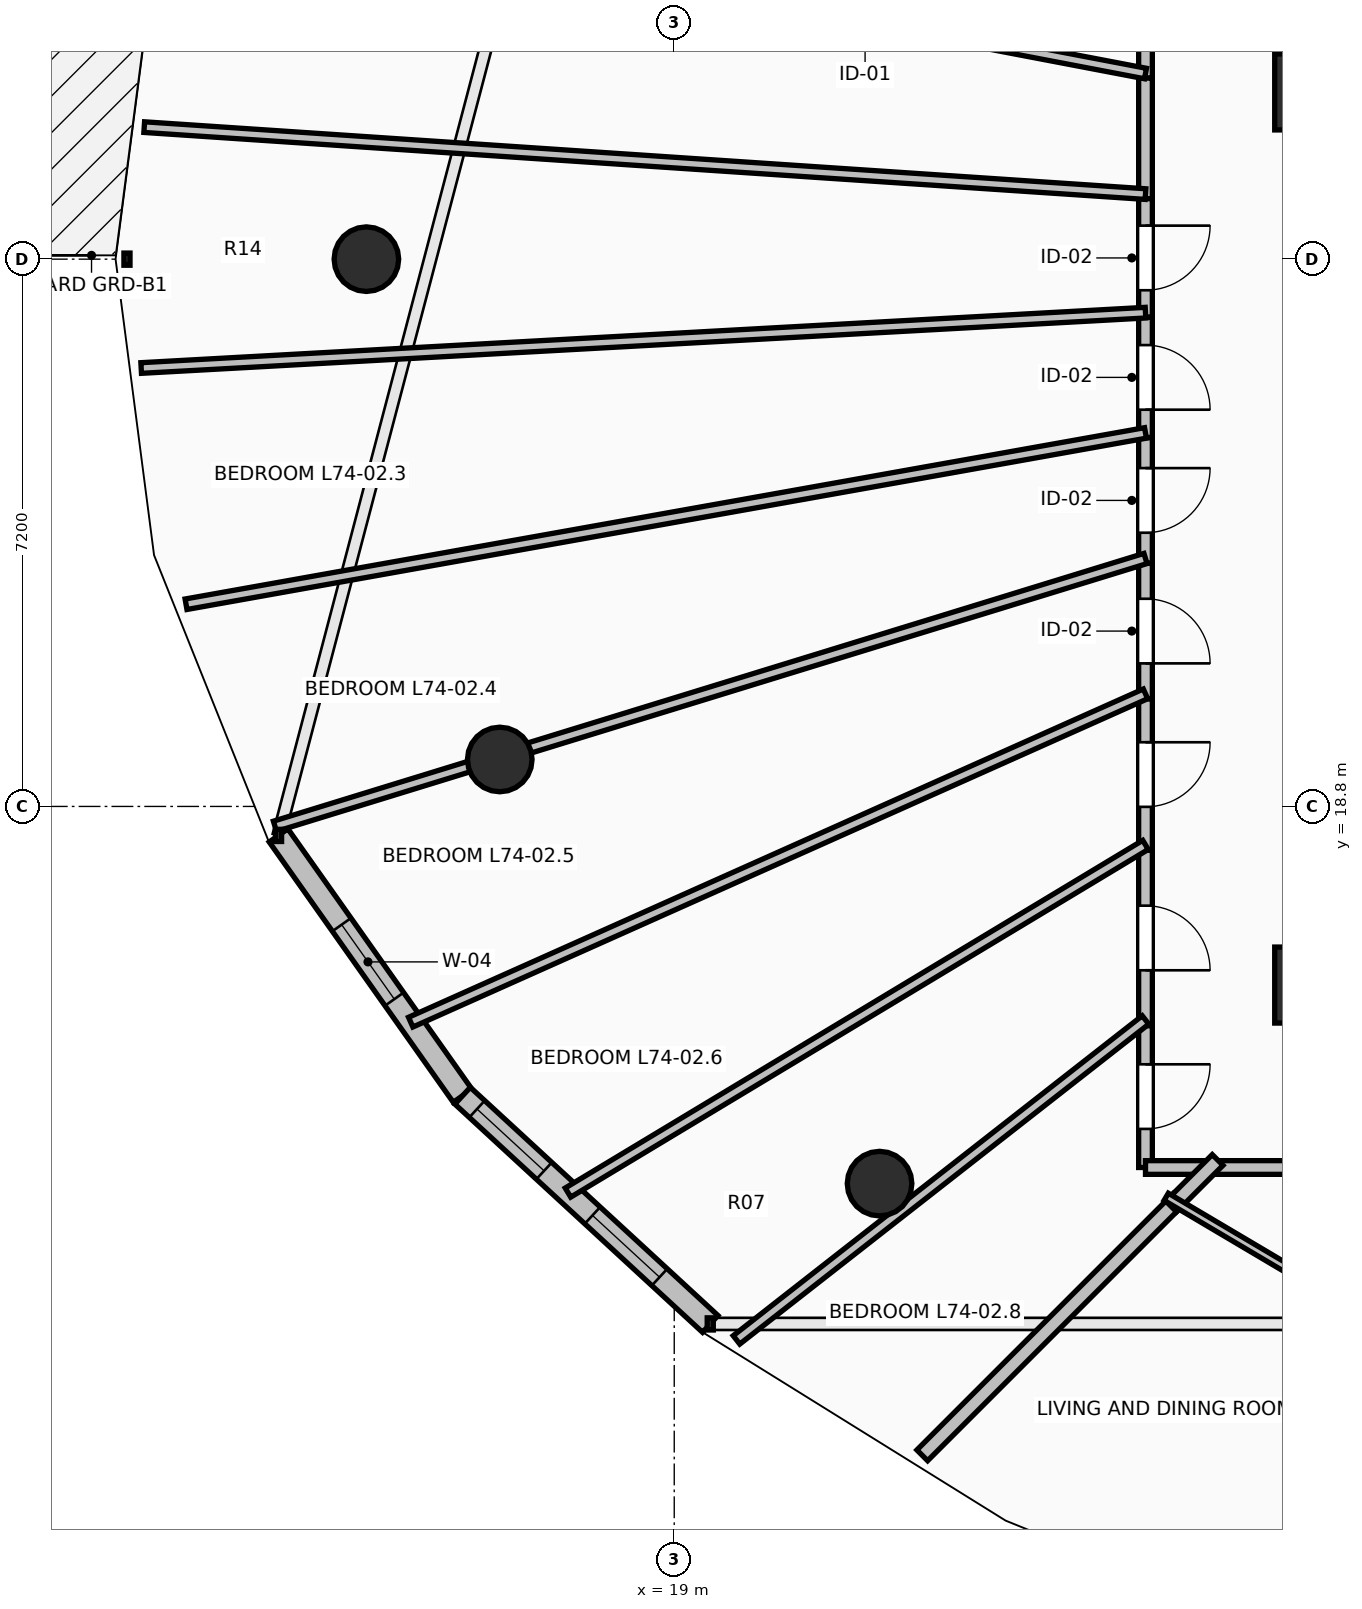
"""IFC4 building model, lengths in metres.
Left out: names, types, materials, properties, quantities, classifications, styles, units other than length and angle.
Written with IfcOpenShell. Run it as: python <this file> out.ifc"""

import sys

from ifc_helpers import new_model, si_unit, direction, frame, frame_2d, origin, origin_2d, place, context, subcontext, project, spatial, rectangle, circle, extrude, element, fill, save


model = new_model("IFC4")
c1 = context("Model", 3, precision=1e-05, world=origin(), true_north=direction((0.0, 1.0)))
c2 = subcontext(c1, "Body", "Model", "MODEL_VIEW")
j1 = project(units=[si_unit("LENGTHUNIT", "METRE"), si_unit("PLANEANGLEUNIT", "RADIAN")], contexts=[c1])
p1 = place(None, origin())
s1 = spatial("IfcSite", under=j1, at=p1, CompositionType="ELEMENT")
p2 = place(p1, origin())
s2 = spatial("IfcBuilding", under=s1, at=p2, CompositionType="ELEMENT")
p3 = place(p2, frame((0.0, 0.0, 273.3)))
s3 = spatial("IfcBuildingStorey", under=s2, at=p3, CompositionType="ELEMENT", Elevation=273.3)
for number, where, z_axis, x_axis in (
    (1, (14.95, 26.0, 0.0), (0.0, 0.0, 1.0), (-1.0, 0.0, 0.0)),
    (2, (16.705, 19.418, 0.0), (0.0, 0.0, 1.0), (-0.924, -0.383, 0.0)),
    (3, (21.701, 13.838, 0.0), (0.0, 0.0, 1.0), (-0.707, -0.707, 0.0)),
):
    element("IfcColumn", number, at=place(p3, frame(where, z_axis=z_axis, x_axis=x_axis)), inside=s3, PredefinedType="COLUMN", context=c2, shape_type="SweptSolid", body=[
        extrude(circle(Radius=0.425, at=origin_2d()), origin(), (0.0, 0.0, 1.0), 3.55),
    ])
for number, where, z_axis, x_axis in (
    (4, (27.25, 16.45, 0.0), (0.0, 0.0, 1.0), (1.0, 0.0, 0.0)),
    (5, (27.25, 28.2, 0.0), (0.0, 0.0, 1.0), (1.0, 0.0, 0.0)),
):
    element("IfcColumn", number, at=place(p3, frame(where, z_axis=z_axis, x_axis=x_axis)), inside=s3, PredefinedType="PILASTER", context=c2, shape_type="SweptSolid", body=[
        extrude(rectangle(XDim=0.7, YDim=1.0, at=origin_2d()), origin(), (0.0, 0.0, 1.0), 3.55),
    ])
p4 = place(p3, frame((13.794, 18.419, 0.0), z_axis=(0.0, 0.0, 1.0), x_axis=(0.577261247247, -0.816559521668, 0.0)))
e6 = element("IfcWall", 6, at=p4, inside=s3, PredefinedType="STANDARD", context=c2, shape_type="SweptSolid", body=[
    extrude(rectangle(XDim=4.194, YDim=0.3, at=frame_2d((2.097, 0.0))), origin(), (0.0, 0.0, 1.0), 3.29),
])
p5 = place(p4, frame((1.438, 0.0, 0.85)))
e7 = element("IfcOpeningElement", 7, at=p5, cuts=e6, PredefinedType="OPENING", context=c2, shape_type="SweptSolid", body=[
    extrude(rectangle(XDim=1.2, YDim=1.95, at=frame_2d((0.6, 0.975))), frame((0.0, 0.165, 0.0), z_axis=(0.0, -1.0, 0.0), x_axis=(1.0, 0.0, 0.0)), (0.0, 0.0, 1.0), 0.33),
])
p6 = place(p3, frame((16.216, 14.994, 0.0), z_axis=(0.0, 0.0, 1.0), x_axis=(0.735445373611, -0.677584018727, 0.0)))
e8 = element("IfcWall", 8, at=p6, inside=s3, PredefinedType="STANDARD", context=c2, shape_type="SweptSolid", body=[
    extrude(rectangle(XDim=4.43, YDim=0.3, at=frame_2d((2.215, 0.0))), origin(), (0.0, 0.0, 1.0), 3.29),
])
p7 = place(p6, frame((0.258, 0.0, 0.85)))
e9 = element("IfcOpeningElement", 9, at=p7, cuts=e8, PredefinedType="OPENING", context=c2, shape_type="SweptSolid", body=[
    extrude(rectangle(XDim=1.2, YDim=1.95, at=frame_2d((0.6, 0.975))), frame((0.0, 0.165, 0.0), z_axis=(0.0, -1.0, 0.0), x_axis=(1.0, 0.0, 0.0)), (0.0, 0.0, 1.0), 0.33),
])
p8 = place(p6, frame((2.323, 0.0, 0.85)))
e10 = element("IfcOpeningElement", 10, at=p8, cuts=e8, PredefinedType="OPENING", context=c2, shape_type="SweptSolid", body=[
    extrude(rectangle(XDim=1.2, YDim=1.95, at=frame_2d((0.6, 0.975))), frame((0.0, 0.165, 0.0), z_axis=(0.0, -1.0, 0.0), x_axis=(1.0, 0.0, 0.0)), (0.0, 0.0, 1.0), 0.33),
])
p9 = place(p3, frame((25.2, 33.445, 0.0), z_axis=(0.0, 0.0, 1.0), x_axis=(0.0, -1.0, 0.0)))
e11 = element("IfcWall", 11, at=p9, inside=s3, PredefinedType="PARTITIONING", context=c2, shape_type="SweptSolid", body=[
    extrude(rectangle(XDim=5.063, YDim=0.18, at=frame_2d((2.531, 0.0))), origin(), (0.0, 0.0, 1.0), 2.482),
])
p10 = place(p9, frame((2.031, 0.0, 0.0)))
e12 = element("IfcOpeningElement", 12, at=p10, cuts=e11, PredefinedType="OPENING", context=c2, shape_type="SweptSolid", body=[
    extrude(rectangle(XDim=1.0, YDim=2.15, at=frame_2d((0.5, 1.075))), frame((0.0, 0.105, 0.0), z_axis=(0.0, -1.0, 0.0), x_axis=(1.0, 0.0, 0.0)), (0.0, 0.0, 1.0), 0.21),
])
p11 = place(p3, frame((25.2, 28.382, 0.0), z_axis=(0.0, 0.0, 1.0), x_axis=(0.0, -1.0, 0.0)))
e13 = element("IfcWall", 13, at=p11, inside=s3, PredefinedType="PARTITIONING", context=c2, shape_type="SweptSolid", body=[
    extrude(rectangle(XDim=1.586, YDim=0.18, at=frame_2d((0.793, 0.0))), origin(), (0.0, 0.0, 1.0), 2.482),
])
p12 = place(p3, frame((25.2, 26.796, 0.0), z_axis=(0.0, 0.0, 1.0), x_axis=(0.0, -1.0, 0.0)))
e14 = element("IfcWall", 14, at=p12, inside=s3, PredefinedType="PARTITIONING", context=c2, shape_type="SweptSolid", body=[
    extrude(rectangle(XDim=1.56, YDim=0.18, at=frame_2d((0.78, 0.0))), origin(), (0.0, 0.0, 1.0), 3.29),
])
p13 = place(p12, frame((0.355, 0.0, 0.0)))
e15 = element("IfcOpeningElement", 15, at=p13, cuts=e14, PredefinedType="OPENING", context=c2, shape_type="SweptSolid", body=[
    extrude(rectangle(XDim=0.85, YDim=2.1, at=frame_2d((0.425, 1.05))), frame((0.0, 0.105, 0.0), z_axis=(0.0, -1.0, 0.0), x_axis=(1.0, 0.0, 0.0)), (0.0, 0.0, 1.0), 0.21),
])
p14 = place(p3, frame((25.2, 25.236, 0.0), z_axis=(0.0, 0.0, 1.0), x_axis=(0.0, -1.0, 0.0)))
e16 = element("IfcWall", 16, at=p14, inside=s3, PredefinedType="PARTITIONING", context=c2, shape_type="SweptSolid", body=[
    extrude(rectangle(XDim=1.583, YDim=0.18, at=frame_2d((0.792, 0.0))), origin(), (0.0, 0.0, 1.0), 3.29),
])
p15 = place(p14, frame((0.366, 0.0, 0.0)))
e17 = element("IfcOpeningElement", 17, at=p15, cuts=e16, PredefinedType="OPENING", context=c2, shape_type="SweptSolid", body=[
    extrude(rectangle(XDim=0.85, YDim=2.1, at=frame_2d((0.425, 1.05))), frame((0.0, 0.105, 0.0), z_axis=(0.0, -1.0, 0.0), x_axis=(1.0, 0.0, 0.0)), (0.0, 0.0, 1.0), 0.21),
])
p16 = place(p3, frame((25.2, 23.653, 0.0), z_axis=(0.0, 0.0, 1.0), x_axis=(0.0, -1.0, 0.0)))
e18 = element("IfcWall", 18, at=p16, inside=s3, PredefinedType="PARTITIONING", context=c2, shape_type="SweptSolid", body=[
    extrude(rectangle(XDim=1.654, YDim=0.18, at=frame_2d((0.827, 0.0))), origin(), (0.0, 0.0, 1.0), 3.29),
])
p17 = place(p16, frame((0.402, 0.0, 0.0)))
e19 = element("IfcOpeningElement", 19, at=p17, cuts=e18, PredefinedType="OPENING", context=c2, shape_type="SweptSolid", body=[
    extrude(rectangle(XDim=0.85, YDim=2.1, at=frame_2d((0.425, 1.05))), frame((0.0, 0.105, 0.0), z_axis=(0.0, -1.0, 0.0), x_axis=(1.0, 0.0, 0.0)), (0.0, 0.0, 1.0), 0.21),
])
p18 = place(p3, frame((25.2, 21.999, 0.0), z_axis=(0.0, 0.0, 1.0), x_axis=(0.0, -1.0, 0.0)))
e20 = element("IfcWall", 20, at=p18, inside=s3, PredefinedType="PARTITIONING", context=c2, shape_type="SweptSolid", body=[
    extrude(rectangle(XDim=1.784, YDim=0.18, at=frame_2d((0.892, 0.0))), origin(), (0.0, 0.0, 1.0), 3.29),
])
p19 = place(p18, frame((0.467, 0.0, 0.0)))
e21 = element("IfcOpeningElement", 21, at=p19, cuts=e20, PredefinedType="OPENING", context=c2, shape_type="SweptSolid", body=[
    extrude(rectangle(XDim=0.85, YDim=2.1, at=frame_2d((0.425, 1.05))), frame((0.0, 0.105, 0.0), z_axis=(0.0, -1.0, 0.0), x_axis=(1.0, 0.0, 0.0)), (0.0, 0.0, 1.0), 0.21),
])
p20 = place(p3, frame((25.2, 20.215, 0.0), z_axis=(0.0, 0.0, 1.0), x_axis=(0.0, -1.0, 0.0)))
e22 = element("IfcWall", 22, at=p20, inside=s3, PredefinedType="PARTITIONING", context=c2, shape_type="SweptSolid", body=[
    extrude(rectangle(XDim=1.991, YDim=0.18, at=frame_2d((0.996, 0.0))), origin(), (0.0, 0.0, 1.0), 3.29),
])
p21 = place(p20, frame((0.571, 0.0, 0.0)))
e23 = element("IfcOpeningElement", 23, at=p21, cuts=e22, PredefinedType="OPENING", context=c2, shape_type="SweptSolid", body=[
    extrude(rectangle(XDim=0.85, YDim=2.1, at=frame_2d((0.425, 1.05))), frame((0.0, 0.105, 0.0), z_axis=(0.0, -1.0, 0.0), x_axis=(1.0, 0.0, 0.0)), (0.0, 0.0, 1.0), 0.21),
])
p22 = place(p3, frame((25.2, 18.224, 0.0), z_axis=(0.0, 0.0, 1.0), x_axis=(0.0, -1.0, 0.0)))
e24 = element("IfcWall", 24, at=p22, inside=s3, PredefinedType="PARTITIONING", context=c2, shape_type="SweptSolid", body=[
    extrude(rectangle(XDim=2.309, YDim=0.18, at=frame_2d((1.155, 0.0))), origin(), (0.0, 0.0, 1.0), 2.482),
])
p23 = place(p22, frame((0.729, 0.0, 0.0)))
e25 = element("IfcOpeningElement", 25, at=p23, cuts=e24, PredefinedType="OPENING", context=c2, shape_type="SweptSolid", body=[
    extrude(rectangle(XDim=0.85, YDim=2.1, at=frame_2d((0.425, 1.05))), frame((0.0, 0.105, 0.0), z_axis=(0.0, -1.0, 0.0), x_axis=(1.0, 0.0, 0.0)), (0.0, 0.0, 1.0), 0.21),
])
p24 = place(p3, frame((25.2, 15.915, 0.0), z_axis=(0.0, 0.0, 1.0), x_axis=(0.0, -1.0, 0.0)))
e26 = element("IfcWall", 26, at=p24, inside=s3, PredefinedType="PARTITIONING", context=c2, shape_type="SweptSolid", body=[
    extrude(rectangle(XDim=1.865, YDim=0.18, at=frame_2d((0.933, 0.0))), origin(), (0.0, 0.0, 1.0), 2.482),
])
p25 = place(p24, frame((0.508, 0.0, 0.0)))
e27 = element("IfcOpeningElement", 27, at=p25, cuts=e26, PredefinedType="OPENING", context=c2, shape_type="SweptSolid", body=[
    extrude(rectangle(XDim=0.85, YDim=2.1, at=frame_2d((0.425, 1.05))), frame((0.0, 0.105, 0.0), z_axis=(0.0, -1.0, 0.0), x_axis=(1.0, 0.0, 0.0)), (0.0, 0.0, 1.0), 0.21),
])
p26 = place(p3, frame((25.2, 14.05, 0.0), z_axis=(0.0, 0.0, 1.0), x_axis=(1.0, 0.0, 0.0)))
e28 = element("IfcWall", 28, at=p26, inside=s3, PredefinedType="PARTITIONING", context=c2, shape_type="SweptSolid", body=[
    extrude(rectangle(XDim=0.91, YDim=0.18, at=frame_2d((0.455, 0.0))), origin(), (0.0, 0.0, 1.0), 2.979),
])
p27 = place(p3, frame((25.97, 14.05, 0.0), z_axis=(0.0, 0.0, 1.0), x_axis=(1.0, 0.0, 0.0)))
e29 = element("IfcWall", 29, at=p27, inside=s3, PredefinedType="PARTITIONING", context=c2, shape_type="SweptSolid", body=[
    extrude(rectangle(XDim=5.215, YDim=0.18, at=frame_2d((2.607, 0.0))), origin(), (0.0, 0.0, 1.0), 2.482),
])
p28 = place(p3, frame((17.889, 29.837, 0.0), z_axis=(0.0, 0.0, 1.0), x_axis=(0.982284262094, -0.187396980877, 0.0)))
e30 = element("IfcWall", 30, at=p28, inside=s3, PredefinedType="PARTITIONING", context=c2, shape_type="SweptSolid", body=[
    extrude(rectangle(XDim=7.443, YDim=0.14, at=frame_2d((3.721, 0.0))), origin(), (0.0, 0.0, 1.0), 2.924),
])
p29 = place(p28, frame((3.271, 0.0, 0.0)))
e31 = element("IfcOpeningElement", 31, at=p29, cuts=e30, PredefinedType="OPENING", context=c2, shape_type="SweptSolid", body=[
    extrude(rectangle(XDim=0.9, YDim=2.1, at=frame_2d((0.45, 1.05))), frame((0.0, 0.085, 0.0), z_axis=(0.0, -1.0, 0.0), x_axis=(1.0, 0.0, 0.0)), (0.0, 0.0, 1.0), 0.17),
])
p30 = place(p3, frame((12.027, 27.737, 0.0), z_axis=(0.0, 0.0, 1.0), x_axis=(0.997770487114, -0.066738707243, 0.0)))
e32 = element("IfcWall", 32, at=p30, inside=s3, PredefinedType="PARTITIONING", context=c2, shape_type="SweptSolid", body=[
    extrude(rectangle(XDim=13.202, YDim=0.14, at=frame_2d((6.601, 0.0))), origin(), (0.0, 0.0, 1.0), 2.482),
])
p31 = place(p3, frame((11.987, 24.568, 0.0), z_axis=(0.0, 0.0, 1.0), x_axis=(0.998486468265, 0.054997933516, 0.0)))
e33 = element("IfcWall", 33, at=p31, inside=s3, PredefinedType="PARTITIONING", context=c2, shape_type="SweptSolid", body=[
    extrude(rectangle(XDim=13.233, YDim=0.14, at=frame_2d((6.616, 0.0))), origin(), (0.0, 0.0, 1.0), 2.874),
])
p32 = place(p3, frame((12.577, 21.46, 0.0), z_axis=(0.0, 0.0, 1.0), x_axis=(0.984427104809, 0.175793274383, 0.0)))
e34 = element("IfcWall", 34, at=p32, inside=s3, PredefinedType="PARTITIONING", context=c2, shape_type="SweptSolid", body=[
    extrude(rectangle(XDim=12.823, YDim=0.14, at=frame_2d((6.411, 0.0))), origin(), (0.0, 0.0, 1.0), 2.874),
])
p33 = place(p3, frame((13.747, 18.539, 0.0), z_axis=(0.0, 0.0, 1.0), x_axis=(0.955802794564, 0.294008533725, 0.0)))
e35 = element("IfcWall", 35, at=p33, inside=s3, PredefinedType="PARTITIONING", context=c2, shape_type="SweptSolid", body=[
    extrude(rectangle(XDim=11.982, YDim=0.14, at=frame_2d((5.991, 0.0))), origin(), (0.0, 0.0, 1.0), 2.482),
])
p34 = place(p3, frame((15.533, 15.962, 0.0), z_axis=(0.0, 0.0, 1.0), x_axis=(0.913015836792, 0.407924112756, 0.0)))
e36 = element("IfcWall", 36, at=p34, inside=s3, PredefinedType="PARTITIONING", context=c2, shape_type="SweptSolid", body=[
    extrude(rectangle(XDim=10.588, YDim=0.14, at=frame_2d((5.294, 0.0))), origin(), (0.0, 0.0, 1.0), 2.482),
])
p35 = place(p3, frame((17.602, 13.72, 0.0), z_axis=(0.0, 0.0, 1.0), x_axis=(0.856734134601, 0.515758298633, 0.0)))
e37 = element("IfcWall", 37, at=p35, inside=s3, PredefinedType="PARTITIONING", context=c2, shape_type="SweptSolid", body=[
    extrude(rectangle(XDim=8.868, YDim=0.14, at=frame_2d((4.434, 0.0))), origin(), (0.0, 0.0, 1.0), 2.482),
])
p36 = place(p3, frame((19.819, 11.782, 0.0), z_axis=(0.0, 0.0, 1.0), x_axis=(0.78765580417, 0.61611552014, 0.0)))
e38 = element("IfcWall", 38, at=p36, inside=s3, PredefinedType="PARTITIONING", context=c2, shape_type="SweptSolid", body=[
    extrude(rectangle(XDim=6.832, YDim=0.14, at=frame_2d((3.416, 0.0))), origin(), (0.0, 0.0, 1.0), 2.482),
])
p37 = place(p3, frame((22.263, 10.263, 0.0), z_axis=(0.0, 0.0, 1.0), x_axis=(0.707106781187, 0.707106781187, 0.0)))
e39 = element("IfcWall", 39, at=p37, inside=s3, PredefinedType="PARTITIONING", context=c2, shape_type="SweptSolid", body=[
    extrude(rectangle(XDim=4.771, YDim=0.2, at=frame_2d((2.386, 0.0))), origin(), (0.0, 0.0, 1.0), 2.874),
])
p38 = place(p3, frame((25.538, 13.538, 0.0), z_axis=(0.0, 0.0, 1.0), x_axis=(0.707106781187, 0.707106781187, 0.0)))
e40 = element("IfcWall", 40, at=p38, inside=s3, PredefinedType="PARTITIONING", context=c2, shape_type="SweptSolid", body=[
    extrude(rectangle(XDim=0.864, YDim=0.2, at=frame_2d((0.432, 0.0))), origin(), (0.0, 0.0, 1.0), 2.979),
])
p39 = place(p3, frame((27.611, 12.399, 0.0), z_axis=(0.0, 0.0, 1.0), x_axis=(-0.860546797705, 0.509371386082, 0.0)))
e41 = element("IfcWall", 41, at=p39, inside=s3, PredefinedType="PARTITIONING", context=c2, shape_type="SweptSolid", body=[
    extrude(rectangle(XDim=2.485, YDim=0.11, at=frame_2d((1.242, 0.0))), origin(), (0.0, 0.0, 1.0), 3.29),
])
p40 = place(p5, origin())
e42 = element("IfcWindow", 42, at=p40, inside=s3, PartitioningType="SINGLE_PANEL", PredefinedType="WINDOW", context=c2, shape_type="SweptSolid", body=[
    extrude(rectangle(XDim=1.2, YDim=1.95, at=frame_2d((0.6, 0.975))), frame((0.0, 0.03, 0.0), z_axis=(0.0, -1.0, 0.0), x_axis=(1.0, 0.0, 0.0)), (0.0, 0.0, 1.0), 0.06),
])
fill(e7, e42)
p41 = place(p7, origin())
e43 = element("IfcWindow", 43, at=p41, inside=s3, PartitioningType="SINGLE_PANEL", PredefinedType="WINDOW", context=c2, shape_type="SweptSolid", body=[
    extrude(rectangle(XDim=1.2, YDim=1.95, at=frame_2d((0.6, 0.975))), frame((0.0, 0.03, 0.0), z_axis=(0.0, -1.0, 0.0), x_axis=(1.0, 0.0, 0.0)), (0.0, 0.0, 1.0), 0.06),
])
fill(e9, e43)
p42 = place(p8, origin())
e44 = element("IfcWindow", 44, at=p42, inside=s3, PartitioningType="SINGLE_PANEL", PredefinedType="WINDOW", context=c2, shape_type="SweptSolid", body=[
    extrude(rectangle(XDim=1.2, YDim=1.95, at=frame_2d((0.6, 0.975))), frame((0.0, 0.03, 0.0), z_axis=(0.0, -1.0, 0.0), x_axis=(1.0, 0.0, 0.0)), (0.0, 0.0, 1.0), 0.06),
])
fill(e10, e44)
p43 = place(p13, origin())
e45 = element("IfcDoor", 45, at=p43, inside=s3, OperationType="SINGLE_SWING_LEFT", PredefinedType="DOOR", context=c2, shape_type="SweptSolid", body=[
    extrude(rectangle(XDim=0.85, YDim=2.1, at=frame_2d((0.425, 1.05))), frame((0.0, 0.025, 0.0), z_axis=(0.0, -1.0, 0.0), x_axis=(1.0, 0.0, 0.0)), (0.0, 0.0, 1.0), 0.05),
])
fill(e15, e45)
p44 = place(p15, origin())
e46 = element("IfcDoor", 46, at=p44, inside=s3, OperationType="SINGLE_SWING_RIGHT", PredefinedType="DOOR", context=c2, shape_type="SweptSolid", body=[
    extrude(rectangle(XDim=0.85, YDim=2.1, at=frame_2d((0.425, 1.05))), frame((0.0, 0.025, 0.0), z_axis=(0.0, -1.0, 0.0), x_axis=(1.0, 0.0, 0.0)), (0.0, 0.0, 1.0), 0.05),
])
fill(e17, e46)
p45 = place(p17, origin())
e47 = element("IfcDoor", 47, at=p45, inside=s3, OperationType="SINGLE_SWING_LEFT", PredefinedType="DOOR", context=c2, shape_type="SweptSolid", body=[
    extrude(rectangle(XDim=0.85, YDim=2.1, at=frame_2d((0.425, 1.05))), frame((0.0, 0.025, 0.0), z_axis=(0.0, -1.0, 0.0), x_axis=(1.0, 0.0, 0.0)), (0.0, 0.0, 1.0), 0.05),
])
fill(e19, e47)
p46 = place(p19, origin())
e48 = element("IfcDoor", 48, at=p46, inside=s3, OperationType="SINGLE_SWING_RIGHT", PredefinedType="DOOR", context=c2, shape_type="SweptSolid", body=[
    extrude(rectangle(XDim=0.85, YDim=2.1, at=frame_2d((0.425, 1.05))), frame((0.0, 0.025, 0.0), z_axis=(0.0, -1.0, 0.0), x_axis=(1.0, 0.0, 0.0)), (0.0, 0.0, 1.0), 0.05),
])
fill(e21, e48)
p47 = place(p21, origin())
e49 = element("IfcDoor", 49, at=p47, inside=s3, OperationType="SINGLE_SWING_LEFT", PredefinedType="DOOR", context=c2, shape_type="SweptSolid", body=[
    extrude(rectangle(XDim=0.85, YDim=2.1, at=frame_2d((0.425, 1.05))), frame((0.0, 0.025, 0.0), z_axis=(0.0, -1.0, 0.0), x_axis=(1.0, 0.0, 0.0)), (0.0, 0.0, 1.0), 0.05),
])
fill(e23, e49)
p48 = place(p23, origin())
e50 = element("IfcDoor", 50, at=p48, inside=s3, OperationType="SINGLE_SWING_RIGHT", PredefinedType="DOOR", context=c2, shape_type="SweptSolid", body=[
    extrude(rectangle(XDim=0.85, YDim=2.1, at=frame_2d((0.425, 1.05))), frame((0.0, 0.025, 0.0), z_axis=(0.0, -1.0, 0.0), x_axis=(1.0, 0.0, 0.0)), (0.0, 0.0, 1.0), 0.05),
])
fill(e25, e50)
p49 = place(p25, origin())
e51 = element("IfcDoor", 51, at=p49, inside=s3, OperationType="SINGLE_SWING_LEFT", PredefinedType="DOOR", context=c2, shape_type="SweptSolid", body=[
    extrude(rectangle(XDim=0.85, YDim=2.1, at=frame_2d((0.425, 1.05))), frame((0.0, 0.025, 0.0), z_axis=(0.0, -1.0, 0.0), x_axis=(1.0, 0.0, 0.0)), (0.0, 0.0, 1.0), 0.05),
])
fill(e27, e51)
save(model, sys.argv[1])
